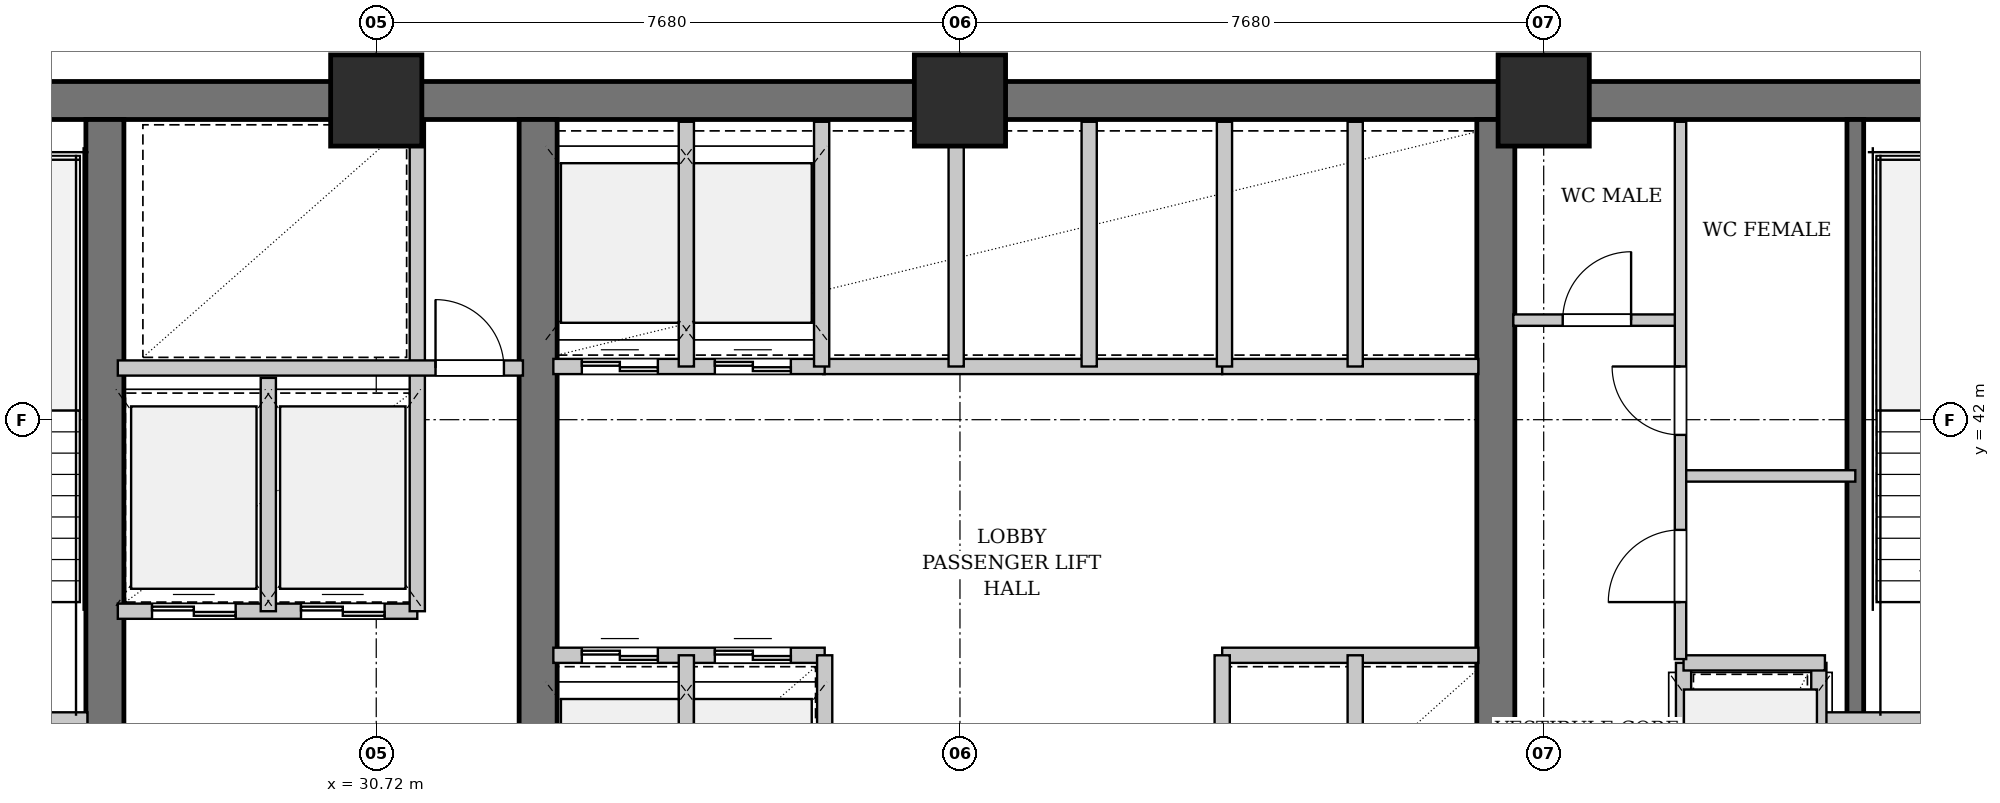
"""IFC4 building model, lengths in metres.
Left out: names, types, materials, properties, quantities, classifications, styles, units other than length and angle.
Written with IfcOpenShell. Run it as: python <this file> out.ifc"""

import sys

from ifc_helpers import new_model, si_unit, direction, frame, frame_2d, origin, origin_2d, place, context, subcontext, project, spatial, rectangle, extrude, element, fill, save


model = new_model("IFC4")
c1 = context("Model", 3, precision=1e-05, world=origin(), true_north=direction((0.0, 1.0)))
c2 = subcontext(c1, "Body", "Model", "MODEL_VIEW")
j1 = project(units=[si_unit("LENGTHUNIT", "METRE"), si_unit("PLANEANGLEUNIT", "RADIAN")], contexts=[c1])
p1 = place(None, origin())
s1 = spatial("IfcSite", under=j1, at=p1, CompositionType="ELEMENT")
p2 = place(p1, origin())
s2 = spatial("IfcBuilding", under=s1, at=p2, CompositionType="ELEMENT")
p3 = place(p2, frame((0.0, 0.0, 64.4)))
s3 = spatial("IfcBuildingStorey", under=s2, at=p3, CompositionType="ELEMENT", Elevation=64.4)
p4 = place(p3, frame((22.79, 46.2, 0.0), z_axis=(0.0, 0.0, 1.0), x_axis=(1.0, 0.0, 0.0)))
e1 = element("IfcWall", 1, at=p4, inside=s3, PredefinedType="SHEAR", context=c2, shape_type="SweptSolid", body=[
    extrude(rectangle(XDim=31.22, YDim=0.5, at=frame_2d((15.61, 0.0))), origin(), (0.0, 0.0, 1.0), 3.18),
])
p5 = place(p3, frame((27.15, 35.65, 0.0), z_axis=(0.0, 0.0, 1.0), x_axis=(0.0, 1.0, 0.0)))
e2 = element("IfcWall", 2, at=p5, inside=s3, PredefinedType="SHEAR", context=c2, shape_type="SweptSolid", body=[
    extrude(rectangle(XDim=10.3, YDim=0.5, at=frame_2d((5.15, 0.0))), origin(), (0.0, 0.0, 1.0), 3.18),
])
p6 = place(p5, frame((0.65, 0.0, 0.0)))
e3 = element("IfcOpeningElement", 3, at=p6, cuts=e2, PredefinedType="OPENING", context=c2, shape_type="SweptSolid", body=[
    extrude(rectangle(XDim=1.1, YDim=2.15, at=frame_2d((0.55, 1.075))), frame((0.0, 0.26, 0.0), z_axis=(0.0, -1.0, 0.0), x_axis=(1.0, 0.0, 0.0)), (0.0, 0.0, 1.0), 0.52),
])
for number, where, z_axis, x_axis in (
    (4, (32.85, 35.65, 0.0), (0.0, 0.0, 1.0), (0.0, 1.0, 0.0)),
    (5, (45.45, 35.65, 0.0), (0.0, 0.0, 1.0), (0.0, 1.0, 0.0)),
):
    element("IfcWall", number, at=place(p3, frame(where, z_axis=z_axis, x_axis=x_axis)), inside=s3, PredefinedType="SHEAR", context=c2, shape_type="SweptSolid", body=[
        extrude(rectangle(XDim=10.3, YDim=0.5, at=frame_2d((5.15, 0.0))), origin(), (0.0, 0.0, 1.0), 3.18),
    ])
p7 = place(p3, frame((50.18, 38.05, 0.0), z_axis=(0.0, 0.0, 1.0), x_axis=(0.0, 1.0, 0.0)))
e6 = element("IfcWall", 6, at=p7, inside=s3, PredefinedType="SHEAR", context=c2, shape_type="SweptSolid", body=[
    extrude(rectangle(XDim=7.9, YDim=0.22, at=frame_2d((3.95, 0.0))), origin(), (0.0, 0.0, 1.0), 3.18),
])
for number, where, z_axis, x_axis in (
    (7, (30.72, 46.2, 0.0), (0.0, 0.0, 1.0), (1.0, 0.0, 0.0)),
    (8, (38.4, 46.2, 0.0), (0.0, 0.0, 1.0), (1.0, 0.0, 0.0)),
    (9, (46.08, 46.2, 0.0), (0.0, 0.0, 1.0), (1.0, 0.0, 0.0)),
):
    element("IfcColumn", number, at=place(p3, frame(where, z_axis=z_axis, x_axis=x_axis)), inside=s3, PredefinedType="COLUMN", context=c2, shape_type="SweptSolid", body=[
        extrude(rectangle(XDim=1.2, YDim=1.2, at=origin_2d()), origin(), (0.0, 0.0, 1.0), 3.4),
    ])
p8 = place(p3, frame((23.3, 38.05, 0.0), z_axis=(0.0, 0.0, 1.0), x_axis=(1.0, 0.0, 0.0)))
e10 = element("IfcWall", 10, at=p8, inside=s3, PredefinedType="PARTITIONING", context=c2, shape_type="SweptSolid", body=[
    extrude(rectangle(XDim=3.62, YDim=0.2, at=frame_2d((1.81, 0.0))), origin(), (0.0, 0.0, 1.0), 3.18),
])
p9 = place(p8, frame((1.26, 0.0, 0.0)))
e11 = element("IfcOpeningElement", 11, at=p9, cuts=e10, PredefinedType="OPENING", context=c2, shape_type="SweptSolid", body=[
    extrude(rectangle(XDim=1.1, YDim=2.15, at=frame_2d((0.55, 1.075))), frame((0.0, 0.11, 0.0), z_axis=(0.0, -1.0, 0.0), x_axis=(1.0, 0.0, 0.0)), (0.0, 0.0, 1.0), 0.22),
])
p10 = place(p3, frame((27.32, 39.48, 0.0), z_axis=(0.0, 0.0, 1.0), x_axis=(1.0, 0.0, 0.0)))
e12 = element("IfcWall", 12, at=p10, inside=s3, PredefinedType="PARTITIONING", context=c2, shape_type="SweptSolid", body=[
    extrude(rectangle(XDim=3.94, YDim=0.2, at=frame_2d((1.97, 0.0))), origin(), (0.0, 0.0, 1.0), 3.18),
])
p11 = place(p10, frame((0.45, 0.0, 0.0)))
e13 = element("IfcOpeningElement", 13, at=p11, cuts=e12, PredefinedType="OPENING", context=c2, shape_type="SweptSolid", body=[
    extrude(rectangle(XDim=1.1, YDim=2.2, at=frame_2d((0.55, 1.1))), frame((0.0, 0.11, 0.0), z_axis=(0.0, -1.0, 0.0), x_axis=(1.0, 0.0, 0.0)), (0.0, 0.0, 1.0), 0.22),
])
p12 = place(p10, frame((2.41, 0.0, 0.0)))
e14 = element("IfcOpeningElement", 14, at=p12, cuts=e12, PredefinedType="OPENING", context=c2, shape_type="SweptSolid", body=[
    extrude(rectangle(XDim=1.1, YDim=2.2, at=frame_2d((0.55, 1.1))), frame((0.0, 0.11, 0.0), z_axis=(0.0, -1.0, 0.0), x_axis=(1.0, 0.0, 0.0)), (0.0, 0.0, 1.0), 0.22),
])
p13 = place(p3, frame((29.3, 39.48, 0.0), z_axis=(0.0, 0.0, 1.0), x_axis=(0.0, 1.0, 0.0)))
e15 = element("IfcWall", 15, at=p13, inside=s3, PredefinedType="PARTITIONING", context=c2, shape_type="SweptSolid", body=[
    extrude(rectangle(XDim=3.07, YDim=0.2, at=frame_2d((1.535, 0.0))), origin(), (0.0, 0.0, 1.0), 3.18),
])
p14 = place(p3, frame((31.26, 39.48, 0.0), z_axis=(0.0, 0.0, 1.0), x_axis=(0.0, 1.0, 0.0)))
e16 = element("IfcWall", 16, at=p14, inside=s3, PredefinedType="PARTITIONING", context=c2, shape_type="SweptSolid", body=[
    extrude(rectangle(XDim=6.44, YDim=0.2, at=frame_2d((3.22, 0.0))), origin(), (0.0, 0.0, 1.0), 3.18),
])
p15 = place(p3, frame((27.32, 42.68, 0.0), z_axis=(0.0, 0.0, 1.0), x_axis=(1.0, 0.0, 0.0)))
e17 = element("IfcWall", 17, at=p15, inside=s3, PredefinedType="PARTITIONING", context=c2, shape_type="SweptSolid", body=[
    extrude(rectangle(XDim=5.33, YDim=0.2, at=frame_2d((2.665, 0.0))), origin(), (0.0, 0.0, 1.0), 3.18),
])
p16 = place(p15, frame((4.18, 0.0, 0.0)))
e18 = element("IfcOpeningElement", 18, at=p16, cuts=e17, PredefinedType="OPENING", context=c2, shape_type="SweptSolid", body=[
    extrude(rectangle(XDim=0.9, YDim=2.15, at=frame_2d((0.45, 1.075))), frame((0.0, 0.11, 0.0), z_axis=(0.0, -1.0, 0.0), x_axis=(1.0, 0.0, 0.0)), (0.0, 0.0, 1.0), 0.22),
])
p17 = place(p3, frame((36.6, 42.7, 0.0), z_axis=(0.0, 0.0, 1.0), x_axis=(1.0, 0.0, 0.0)))
e19 = element("IfcWall", 19, at=p17, inside=s3, PredefinedType="PARTITIONING", context=c2, shape_type="SweptSolid", body=[
    extrude(rectangle(XDim=5.25, YDim=0.2, at=frame_2d((2.625, 0.0))), origin(), (0.0, 0.0, 1.0), 3.18),
])
p18 = place(p3, frame((38.35, 42.7, 0.0), z_axis=(0.0, 0.0, 1.0), x_axis=(0.0, 1.0, 0.0)))
e20 = element("IfcWall", 20, at=p18, inside=s3, PredefinedType="PARTITIONING", context=c2, shape_type="SweptSolid", body=[
    extrude(rectangle(XDim=3.22, YDim=0.2, at=frame_2d((1.61, 0.0))), origin(), (0.0, 0.0, 1.0), 2.475),
])
p19 = place(p3, frame((40.1, 42.7, 0.0), z_axis=(0.0, 0.0, 1.0), x_axis=(0.0, 1.0, 0.0)))
e21 = element("IfcWall", 21, at=p19, inside=s3, PredefinedType="PARTITIONING", context=c2, shape_type="SweptSolid", body=[
    extrude(rectangle(XDim=3.22, YDim=0.2, at=frame_2d((1.61, 0.0))), origin(), (0.0, 0.0, 1.0), 3.18),
])
p20 = place(p3, frame((33.05, 38.9, 0.0), z_axis=(0.0, 0.0, 1.0), x_axis=(1.0, 0.0, 0.0)))
e22 = element("IfcWall", 22, at=p20, inside=s3, PredefinedType="PARTITIONING", context=c2, shape_type="SweptSolid", body=[
    extrude(rectangle(XDim=3.57, YDim=0.2, at=frame_2d((1.785, 0.0))), origin(), (0.0, 0.0, 1.0), 3.18),
])
p21 = place(p20, frame((0.375, 0.0, 0.0)))
e23 = element("IfcOpeningElement", 23, at=p21, cuts=e22, PredefinedType="OPENING", context=c2, shape_type="SweptSolid", body=[
    extrude(rectangle(XDim=1.0, YDim=2.2, at=frame_2d((0.5, 1.1))), frame((0.0, 0.11, 0.0), z_axis=(0.0, -1.0, 0.0), x_axis=(1.0, 0.0, 0.0)), (0.0, 0.0, 1.0), 0.22),
])
p22 = place(p20, frame((2.125, 0.0, 0.0)))
e24 = element("IfcOpeningElement", 24, at=p22, cuts=e22, PredefinedType="OPENING", context=c2, shape_type="SweptSolid", body=[
    extrude(rectangle(XDim=1.0, YDim=2.2, at=frame_2d((0.5, 1.1))), frame((0.0, 0.11, 0.0), z_axis=(0.0, -1.0, 0.0), x_axis=(1.0, 0.0, 0.0)), (0.0, 0.0, 1.0), 0.22),
])
p23 = place(p3, frame((33.05, 42.7, 0.0), z_axis=(0.0, 0.0, 1.0), x_axis=(1.0, 0.0, 0.0)))
e25 = element("IfcWall", 25, at=p23, inside=s3, PredefinedType="PARTITIONING", context=c2, shape_type="SweptSolid", body=[
    extrude(rectangle(XDim=3.57, YDim=0.2, at=frame_2d((1.785, 0.0))), origin(), (0.0, 0.0, 1.0), 3.18),
])
p24 = place(p23, frame((0.375, 0.0, 0.0)))
e26 = element("IfcOpeningElement", 26, at=p24, cuts=e25, PredefinedType="OPENING", context=c2, shape_type="SweptSolid", body=[
    extrude(rectangle(XDim=1.0, YDim=2.2, at=frame_2d((0.5, 1.1))), frame((0.0, 0.11, 0.0), z_axis=(0.0, -1.0, 0.0), x_axis=(1.0, 0.0, 0.0)), (0.0, 0.0, 1.0), 0.22),
])
p25 = place(p23, frame((2.125, 0.0, 0.0)))
e27 = element("IfcOpeningElement", 27, at=p25, cuts=e25, PredefinedType="OPENING", context=c2, shape_type="SweptSolid", body=[
    extrude(rectangle(XDim=1.0, YDim=2.2, at=frame_2d((0.5, 1.1))), frame((0.0, 0.11, 0.0), z_axis=(0.0, -1.0, 0.0), x_axis=(1.0, 0.0, 0.0)), (0.0, 0.0, 1.0), 0.22),
])
p26 = place(p3, frame((34.8, 35.65, 0.0), z_axis=(0.0, 0.0, 1.0), x_axis=(0.0, 1.0, 0.0)))
e28 = element("IfcWall", 28, at=p26, inside=s3, PredefinedType="PARTITIONING", context=c2, shape_type="SweptSolid", body=[
    extrude(rectangle(XDim=3.25, YDim=0.2, at=frame_2d((1.625, 0.0))), origin(), (0.0, 0.0, 1.0), 3.18),
])
p27 = place(p3, frame((34.8, 42.7, 0.0), z_axis=(0.0, 0.0, 1.0), x_axis=(0.0, 1.0, 0.0)))
e29 = element("IfcWall", 29, at=p27, inside=s3, PredefinedType="PARTITIONING", context=c2, shape_type="SweptSolid", body=[
    extrude(rectangle(XDim=3.22, YDim=0.2, at=frame_2d((1.61, 0.0))), origin(), (0.0, 0.0, 1.0), 3.18),
])
p28 = place(p3, frame((36.62, 35.5, 0.0), z_axis=(0.0, 0.0, 1.0), x_axis=(0.0, 1.0, 0.0)))
e30 = element("IfcWall", 30, at=p28, inside=s3, PredefinedType="PARTITIONING", context=c2, shape_type="SweptSolid", body=[
    extrude(rectangle(XDim=3.4, YDim=0.2, at=frame_2d((1.7, 0.0))), origin(), (0.0, 0.0, 1.0), 3.18),
])
p29 = place(p3, frame((36.58, 42.7, 0.0), z_axis=(0.0, 0.0, 1.0), x_axis=(0.0, 1.0, 0.0)))
e31 = element("IfcWall", 31, at=p29, inside=s3, PredefinedType="PARTITIONING", context=c2, shape_type="SweptSolid", body=[
    extrude(rectangle(XDim=3.22, YDim=0.2, at=frame_2d((1.61, 0.0))), origin(), (0.0, 0.0, 1.0), 3.18),
])
for number, where, z_axis, x_axis in (
    (32, (41.85, 38.9, 0.0), (0.0, 0.0, 1.0), (1.0, 0.0, 0.0)),
    (33, (41.85, 42.7, 0.0), (0.0, 0.0, 1.0), (1.0, 0.0, 0.0)),
):
    element("IfcWall", number, at=place(p3, frame(where, z_axis=z_axis, x_axis=x_axis)), inside=s3, PredefinedType="PARTITIONING", context=c2, shape_type="SweptSolid", body=[
        extrude(rectangle(XDim=3.37, YDim=0.2, at=frame_2d((1.685, 0.0))), origin(), (0.0, 0.0, 1.0), 3.18),
    ])
p30 = place(p3, frame((43.6, 35.65, 0.0), z_axis=(0.0, 0.0, 1.0), x_axis=(0.0, 1.0, 0.0)))
e34 = element("IfcWall", 34, at=p30, inside=s3, PredefinedType="PARTITIONING", context=c2, shape_type="SweptSolid", body=[
    extrude(rectangle(XDim=3.25, YDim=0.2, at=frame_2d((1.625, 0.0))), origin(), (0.0, 0.0, 1.0), 3.18),
])
p31 = place(p3, frame((43.6, 42.7, 0.0), z_axis=(0.0, 0.0, 1.0), x_axis=(0.0, 1.0, 0.0)))
e35 = element("IfcWall", 35, at=p31, inside=s3, PredefinedType="PARTITIONING", context=c2, shape_type="SweptSolid", body=[
    extrude(rectangle(XDim=3.22, YDim=0.2, at=frame_2d((1.61, 0.0))), origin(), (0.0, 0.0, 1.0), 3.18),
])
p32 = place(p3, frame((41.85, 35.5, 0.0), z_axis=(0.0, 0.0, 1.0), x_axis=(0.0, 1.0, 0.0)))
e36 = element("IfcWall", 36, at=p32, inside=s3, PredefinedType="PARTITIONING", context=c2, shape_type="SweptSolid", body=[
    extrude(rectangle(XDim=3.4, YDim=0.2, at=frame_2d((1.7, 0.0))), origin(), (0.0, 0.0, 1.0), 3.18),
])
p33 = place(p3, frame((41.88, 42.7, 0.0), z_axis=(0.0, 0.0, 1.0), x_axis=(0.0, 1.0, 0.0)))
e37 = element("IfcWall", 37, at=p33, inside=s3, PredefinedType="PARTITIONING", context=c2, shape_type="SweptSolid", body=[
    extrude(rectangle(XDim=3.22, YDim=0.2, at=frame_2d((1.61, 0.0))), origin(), (0.0, 0.0, 1.0), 3.18),
])
p34 = place(p3, frame((49.78, 38.05, 0.0), z_axis=(0.0, 0.0, 1.0), x_axis=(1.0, 0.0, 0.0)))
e38 = element("IfcWall", 38, at=p34, inside=s3, PredefinedType="PARTITIONING", context=c2, shape_type="SweptSolid", body=[
    extrude(rectangle(XDim=3.72, YDim=0.2, at=frame_2d((1.86, 0.0))), origin(), (0.0, 0.0, 1.0), 3.18),
])
p35 = place(p34, frame((1.436, 0.0, 0.0)))
e39 = element("IfcOpeningElement", 39, at=p35, cuts=e38, PredefinedType="OPENING", context=c2, shape_type="SweptSolid", body=[
    extrude(rectangle(XDim=1.1, YDim=2.15, at=frame_2d((0.55, 1.075))), frame((0.0, 0.11, 0.0), z_axis=(0.0, -1.0, 0.0), x_axis=(1.0, 0.0, 0.0)), (0.0, 0.0, 1.0), 0.22),
])
p36 = place(p3, frame((49.7, 35.65, 0.0), z_axis=(0.0, 0.0, 1.0), x_axis=(0.0, 1.0, 0.0)))
e40 = element("IfcWall", 40, at=p36, inside=s3, PredefinedType="PARTITIONING", context=c2, shape_type="SweptSolid", body=[
    extrude(rectangle(XDim=3.15, YDim=0.2, at=frame_2d((1.575, 0.0))), origin(), (0.0, 0.0, 1.0), 3.18),
])
p37 = place(p36, frame((0.85, 0.0, 0.0)))
e41 = element("IfcOpeningElement", 41, at=p37, cuts=e40, PredefinedType="OPENING", context=c2, shape_type="SweptSolid", body=[
    extrude(rectangle(XDim=1.2, YDim=2.2, at=frame_2d((0.6, 1.1))), frame((0.0, 0.11, 0.0), z_axis=(0.0, -1.0, 0.0), x_axis=(1.0, 0.0, 0.0)), (0.0, 0.0, 1.0), 0.22),
])
p38 = place(p3, frame((47.92, 35.65, 0.0), z_axis=(0.0, 0.0, 1.0), x_axis=(0.0, 1.0, 0.0)))
e42 = element("IfcWall", 42, at=p38, inside=s3, PredefinedType="PARTITIONING", context=c2, shape_type="SweptSolid", body=[
    extrude(rectangle(XDim=3.15, YDim=0.2, at=frame_2d((1.575, 0.0))), origin(), (0.0, 0.0, 1.0), 3.18),
])
p39 = place(p3, frame((47.92, 38.8, 0.0), z_axis=(0.0, 0.0, 1.0), x_axis=(1.0, 0.0, 0.0)))
e43 = element("IfcWall", 43, at=p39, inside=s3, PredefinedType="PARTITIONING", context=c2, shape_type="SweptSolid", body=[
    extrude(rectangle(XDim=1.86, YDim=0.2, at=frame_2d((0.93, 0.0))), origin(), (0.0, 0.0, 1.0), 3.18),
])
p40 = place(p3, frame((45.68, 43.31, 0.0), z_axis=(0.0, 0.0, 1.0), x_axis=(1.0, 0.0, 0.0)))
e44 = element("IfcWall", 44, at=p40, inside=s3, PredefinedType="PARTITIONING", context=c2, shape_type="SweptSolid", body=[
    extrude(rectangle(XDim=2.2, YDim=0.15, at=frame_2d((1.1, 0.0))), origin(), (0.0, 0.0, 1.0), 3.18),
])
p41 = place(p40, frame((0.65, 0.0, 0.0)))
e45 = element("IfcOpeningElement", 45, at=p41, cuts=e44, PredefinedType="OPENING", context=c2, shape_type="SweptSolid", body=[
    extrude(rectangle(XDim=0.9, YDim=2.15, at=frame_2d((0.45, 1.075))), frame((0.0, 0.085, 0.0), z_axis=(0.0, -1.0, 0.0), x_axis=(1.0, 0.0, 0.0)), (0.0, 0.0, 1.0), 0.17),
])
p42 = place(p3, frame((47.88, 41.26, 0.0), z_axis=(0.0, 0.0, 1.0), x_axis=(1.0, 0.0, 0.0)))
e46 = element("IfcWall", 46, at=p42, inside=s3, PredefinedType="PARTITIONING", context=c2, shape_type="SweptSolid", body=[
    extrude(rectangle(XDim=2.3, YDim=0.15, at=frame_2d((1.15, 0.0))), origin(), (0.0, 0.0, 1.0), 3.18),
])
p43 = place(p3, frame((47.88, 38.85, 0.0), z_axis=(0.0, 0.0, 1.0), x_axis=(0.0, 1.0, 0.0)))
e47 = element("IfcWall", 47, at=p43, inside=s3, PredefinedType="PARTITIONING", context=c2, shape_type="SweptSolid", body=[
    extrude(rectangle(XDim=7.07, YDim=0.15, at=frame_2d((3.535, 0.0))), origin(), (0.0, 0.0, 1.0), 3.18),
])
p44 = place(p43, frame((0.75, 0.0, 0.0)))
e48 = element("IfcOpeningElement", 48, at=p44, cuts=e47, PredefinedType="OPENING", context=c2, shape_type="SweptSolid", body=[
    extrude(rectangle(XDim=0.95, YDim=2.15, at=frame_2d((0.475, 1.075))), frame((0.0, 0.085, 0.0), z_axis=(0.0, -1.0, 0.0), x_axis=(1.0, 0.0, 0.0)), (0.0, 0.0, 1.0), 0.17),
])
p45 = place(p43, frame((2.95, 0.0, 0.0)))
e49 = element("IfcOpeningElement", 49, at=p45, cuts=e47, PredefinedType="OPENING", context=c2, shape_type="SweptSolid", body=[
    extrude(rectangle(XDim=0.9, YDim=2.15, at=frame_2d((0.45, 1.075))), frame((0.0, 0.085, 0.0), z_axis=(0.0, -1.0, 0.0), x_axis=(1.0, 0.0, 0.0)), (0.0, 0.0, 1.0), 0.17),
])
p46 = place(p11, origin())
e50 = element("IfcDoor", 50, at=p46, inside=s3, OperationType="DOUBLE_DOOR_SLIDING", PredefinedType="DOOR", context=c2, shape_type="SweptSolid", body=[
    extrude(rectangle(XDim=1.1, YDim=2.2, at=frame_2d((0.55, 1.1))), frame((0.0, 0.025, 0.0), z_axis=(0.0, -1.0, 0.0), x_axis=(1.0, 0.0, 0.0)), (0.0, 0.0, 1.0), 0.05),
])
fill(e13, e50)
p47 = place(p12, origin())
e51 = element("IfcDoor", 51, at=p47, inside=s3, OperationType="DOUBLE_DOOR_SLIDING", PredefinedType="DOOR", context=c2, shape_type="SweptSolid", body=[
    extrude(rectangle(XDim=1.1, YDim=2.2, at=frame_2d((0.55, 1.1))), frame((0.0, 0.025, 0.0), z_axis=(0.0, -1.0, 0.0), x_axis=(1.0, 0.0, 0.0)), (0.0, 0.0, 1.0), 0.05),
])
fill(e14, e51)
p48 = place(p16, origin())
e52 = element("IfcDoor", 52, at=p48, inside=s3, OperationType="SINGLE_SWING_LEFT", PredefinedType="DOOR", context=c2, shape_type="SweptSolid", body=[
    extrude(rectangle(XDim=0.9, YDim=2.15, at=frame_2d((0.45, 1.075))), frame((0.0, 0.025, 0.0), z_axis=(0.0, -1.0, 0.0), x_axis=(1.0, 0.0, 0.0)), (0.0, 0.0, 1.0), 0.05),
])
fill(e18, e52)
p49 = place(p21, origin())
e53 = element("IfcDoor", 53, at=p49, inside=s3, OperationType="DOUBLE_DOOR_SLIDING", PredefinedType="DOOR", context=c2, shape_type="SweptSolid", body=[
    extrude(rectangle(XDim=1.0, YDim=2.2, at=frame_2d((0.5, 1.1))), frame((0.0, 0.025, 0.0), z_axis=(0.0, -1.0, 0.0), x_axis=(1.0, 0.0, 0.0)), (0.0, 0.0, 1.0), 0.05),
])
fill(e23, e53)
p50 = place(p22, origin())
e54 = element("IfcDoor", 54, at=p50, inside=s3, OperationType="DOUBLE_DOOR_SLIDING", PredefinedType="DOOR", context=c2, shape_type="SweptSolid", body=[
    extrude(rectangle(XDim=1.0, YDim=2.2, at=frame_2d((0.5, 1.1))), frame((0.0, 0.025, 0.0), z_axis=(0.0, -1.0, 0.0), x_axis=(1.0, 0.0, 0.0)), (0.0, 0.0, 1.0), 0.05),
])
fill(e24, e54)
p51 = place(p24, origin())
e55 = element("IfcDoor", 55, at=p51, inside=s3, OperationType="DOUBLE_DOOR_SLIDING", PredefinedType="DOOR", context=c2, shape_type="SweptSolid", body=[
    extrude(rectangle(XDim=1.0, YDim=2.2, at=frame_2d((0.5, 1.1))), frame((0.0, 0.025, 0.0), z_axis=(0.0, -1.0, 0.0), x_axis=(1.0, 0.0, 0.0)), (0.0, 0.0, 1.0), 0.05),
])
fill(e26, e55)
p52 = place(p25, origin())
e56 = element("IfcDoor", 56, at=p52, inside=s3, OperationType="DOUBLE_DOOR_SLIDING", PredefinedType="DOOR", context=c2, shape_type="SweptSolid", body=[
    extrude(rectangle(XDim=1.0, YDim=2.2, at=frame_2d((0.5, 1.1))), frame((0.0, 0.025, 0.0), z_axis=(0.0, -1.0, 0.0), x_axis=(1.0, 0.0, 0.0)), (0.0, 0.0, 1.0), 0.05),
])
fill(e27, e56)
p53 = place(p41, origin())
e57 = element("IfcDoor", 57, at=p53, inside=s3, OperationType="SINGLE_SWING_RIGHT", PredefinedType="DOOR", context=c2, shape_type="SweptSolid", body=[
    extrude(rectangle(XDim=0.9, YDim=2.15, at=frame_2d((0.45, 1.075))), frame((0.0, 0.025, 0.0), z_axis=(0.0, -1.0, 0.0), x_axis=(1.0, 0.0, 0.0)), (0.0, 0.0, 1.0), 0.05),
])
fill(e45, e57)
p54 = place(p44, origin())
e58 = element("IfcDoor", 58, at=p54, inside=s3, OperationType="SINGLE_SWING_LEFT", PredefinedType="DOOR", context=c2, shape_type="SweptSolid", body=[
    extrude(rectangle(XDim=0.95, YDim=2.15, at=frame_2d((0.475, 1.075))), frame((0.0, 0.025, 0.0), z_axis=(0.0, -1.0, 0.0), x_axis=(1.0, 0.0, 0.0)), (0.0, 0.0, 1.0), 0.05),
])
fill(e48, e58)
p55 = place(p45, origin())
e59 = element("IfcDoor", 59, at=p55, inside=s3, OperationType="SINGLE_SWING_RIGHT", PredefinedType="DOOR", context=c2, shape_type="SweptSolid", body=[
    extrude(rectangle(XDim=0.9, YDim=2.15, at=frame_2d((0.45, 1.075))), frame((0.0, 0.025, 0.0), z_axis=(0.0, -1.0, 0.0), x_axis=(1.0, 0.0, 0.0)), (0.0, 0.0, 1.0), 0.05),
])
fill(e49, e59)
save(model, sys.argv[1])
